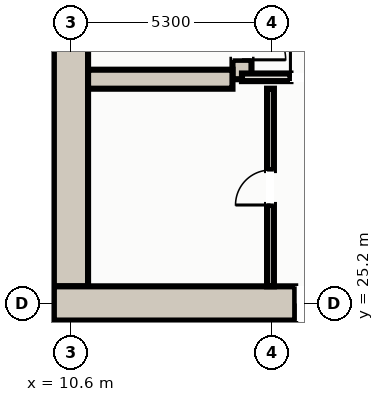
"""IFC4 building model, lengths in metres.
Left out: names, types, materials, properties, quantities, classifications, styles, units other than length and angle.
Written with IfcOpenShell. Run it as: python <this file> out.ifc"""

import sys

from ifc_helpers import new_model, si_unit, direction, frame, frame_2d, origin, place, context, subcontext, project, spatial, rectangle, extrude, element, fill, save


model = new_model("IFC4")
c1 = context("Model", 3, precision=1e-05, world=origin(), true_north=direction((0.0, 1.0)))
c2 = subcontext(c1, "Body", "Model", "MODEL_VIEW")
j1 = project(units=[si_unit("LENGTHUNIT", "METRE"), si_unit("PLANEANGLEUNIT", "RADIAN")], contexts=[c1])
p1 = place(None, origin())
s1 = spatial("IfcSite", under=j1, at=p1, CompositionType="ELEMENT")
p2 = place(p1, origin())
s2 = spatial("IfcBuilding", under=s1, at=p2, CompositionType="ELEMENT")
p3 = place(p2, origin())
s3 = spatial("IfcBuildingStorey", under=s2, at=p3, CompositionType="ELEMENT", Elevation=0.0)
p4 = place(p3, frame((10.6, 25.65, 0.0), z_axis=(0.0, 0.0, 1.0), x_axis=(0.0, 1.0, 0.0)))
e1 = element("IfcWall", 1, at=p4, inside=s3, PredefinedType="SHEAR", context=c2, shape_type="SweptSolid", body=[
    extrude(rectangle(XDim=13.9, YDim=0.9, at=frame_2d((6.95, 0.0))), origin(), (0.0, 0.0, 1.0), 4.95),
])
p5 = place(p3, frame((10.15, 25.2, 0.0), z_axis=(0.0, 0.0, 1.0), x_axis=(1.0, 0.0, 0.0)))
e2 = element("IfcWall", 2, at=p5, inside=s3, PredefinedType="SHEAR", context=c2, shape_type="SweptSolid", body=[
    extrude(rectangle(XDim=8.25, YDim=0.9, at=frame_2d((4.125, 0.0))), origin(), (0.0, 0.0, 1.0), 4.95),
])
p6 = place(p5, frame((6.35, 0.0, 0.0)))
e3 = element("IfcOpeningElement", 3, at=p6, cuts=e2, PredefinedType="OPENING", context=c2, shape_type="SweptSolid", body=[
    extrude(rectangle(XDim=1.25, YDim=2.2, at=frame_2d((0.625, 1.1))), frame((0.0, 0.46, 0.0), z_axis=(0.0, -1.0, 0.0), x_axis=(1.0, 0.0, 0.0)), (0.0, 0.0, 1.0), 0.92),
])
p7 = place(p3, frame((15.1, 31.1, 0.0), z_axis=(0.0, 0.0, 1.0), x_axis=(0.0, 1.0, 0.0)))
e4 = element("IfcWall", 4, at=p7, inside=s3, PredefinedType="SHEAR", context=c2, shape_type="SweptSolid", body=[
    extrude(rectangle(XDim=8.45, YDim=0.5, at=frame_2d((4.225, 0.0))), origin(), (0.0, 0.0, 1.0), 4.95),
])
p8 = place(p7, frame((0.51, 0.0, 0.0)))
e5 = element("IfcOpeningElement", 5, at=p8, cuts=e4, PredefinedType="OPENING", context=c2, shape_type="SweptSolid", body=[
    extrude(rectangle(XDim=1.15, YDim=2.2, at=frame_2d((0.575, 1.1))), frame((0.0, 0.26, 0.0), z_axis=(0.0, -1.0, 0.0), x_axis=(1.0, 0.0, 0.0)), (0.0, 0.0, 1.0), 0.52),
])
p9 = place(p3, frame((11.05, 31.1, 0.0), z_axis=(0.0, 0.0, 1.0), x_axis=(1.0, 0.0, 0.0)))
e6 = element("IfcWall", 6, at=p9, inside=s3, PredefinedType="SHEAR", context=c2, shape_type="SweptSolid", body=[
    extrude(rectangle(XDim=3.8, YDim=0.5, at=frame_2d((1.9, 0.0))), origin(), (0.0, 0.0, 1.0), 4.95),
])
p10 = place(p3, frame((15.1, 31.15, 0.0), z_axis=(0.0, 0.0, 1.0), x_axis=(1.0, 0.0, 0.0)))
e7 = element("IfcWall", 7, at=p10, inside=s3, PredefinedType="PARTITIONING", context=c2, shape_type="SweptSolid", body=[
    extrude(rectangle(XDim=3.25, YDim=0.2, at=frame_2d((1.625, 0.0))), origin(), (0.0, 0.0, 1.0), 4.95),
])
p11 = place(p10, frame((1.275, 0.0, 0.0)))
e8 = element("IfcOpeningElement", 8, at=p11, cuts=e7, PredefinedType="OPENING", context=c2, shape_type="SweptSolid", body=[
    extrude(rectangle(XDim=1.25, YDim=2.2, at=frame_2d((0.625, 1.1))), frame((0.0, 0.11, 0.0), z_axis=(0.0, -1.0, 0.0), x_axis=(1.0, 0.0, 0.0)), (0.0, 0.0, 1.0), 0.22),
])
p12 = place(p3, frame((15.85, 25.65, 0.0), z_axis=(0.0, 0.0, 1.0), x_axis=(0.0, 1.0, 0.0)))
e9 = element("IfcWall", 9, at=p12, inside=s3, PredefinedType="PARTITIONING", context=c2, shape_type="SweptSolid", body=[
    extrude(rectangle(XDim=5.2, YDim=0.18, at=frame_2d((2.6, 0.0))), origin(), (0.0, 0.0, 1.0), 4.95),
])
p13 = place(p12, frame((2.14, 0.0, 0.0)))
e10 = element("IfcOpeningElement", 10, at=p13, cuts=e9, PredefinedType="OPENING", context=c2, shape_type="SweptSolid", body=[
    extrude(rectangle(XDim=0.92, YDim=2.15, at=frame_2d((0.46, 1.075))), frame((0.0, 0.1, 0.0), z_axis=(0.0, -1.0, 0.0), x_axis=(1.0, 0.0, 0.0)), (0.0, 0.0, 1.0), 0.2),
])
p14 = place(p6, frame((1.25, 0.0, 0.0), z_axis=(0.0, 0.0, 1.0), x_axis=(-1.0, 0.0, 0.0)))
e11 = element("IfcDoor", 11, at=p14, inside=s3, OperationType="SINGLE_SWING_RIGHT", PredefinedType="DOOR", context=c2, shape_type="SweptSolid", body=[
    extrude(rectangle(XDim=1.25, YDim=2.2, at=frame_2d((0.625, 1.1))), frame((0.0, 0.025, 0.0), z_axis=(0.0, -1.0, 0.0), x_axis=(1.0, 0.0, 0.0)), (0.0, 0.0, 1.0), 0.05),
])
fill(e3, e11)
p15 = place(p11, origin())
e12 = element("IfcDoor", 12, at=p15, inside=s3, OperationType="SINGLE_SWING_LEFT", PredefinedType="DOOR", context=c2, shape_type="SweptSolid", body=[
    extrude(rectangle(XDim=1.25, YDim=2.2, at=frame_2d((0.625, 1.1))), frame((0.0, 0.025, 0.0), z_axis=(0.0, -1.0, 0.0), x_axis=(1.0, 0.0, 0.0)), (0.0, 0.0, 1.0), 0.05),
])
fill(e8, e12)
p16 = place(p8, frame((1.15, 0.0, 0.0), z_axis=(0.0, 0.0, 1.0), x_axis=(-1.0, 0.0, 0.0)))
e13 = element("IfcDoor", 13, at=p16, inside=s3, OperationType="SINGLE_SWING_RIGHT", PredefinedType="DOOR", context=c2, shape_type="SweptSolid", body=[
    extrude(rectangle(XDim=1.15, YDim=2.2, at=frame_2d((0.575, 1.1))), frame((0.0, 0.025, 0.0), z_axis=(0.0, -1.0, 0.0), x_axis=(1.0, 0.0, 0.0)), (0.0, 0.0, 1.0), 0.05),
])
fill(e5, e13)
p17 = place(p13, origin())
e14 = element("IfcDoor", 14, at=p17, inside=s3, OperationType="SINGLE_SWING_LEFT", PredefinedType="DOOR", context=c2, shape_type="SweptSolid", body=[
    extrude(rectangle(XDim=0.92, YDim=2.15, at=frame_2d((0.46, 1.075))), frame((0.0, 0.025, 0.0), z_axis=(0.0, -1.0, 0.0), x_axis=(1.0, 0.0, 0.0)), (0.0, 0.0, 1.0), 0.05),
])
fill(e10, e14)
save(model, sys.argv[1])
